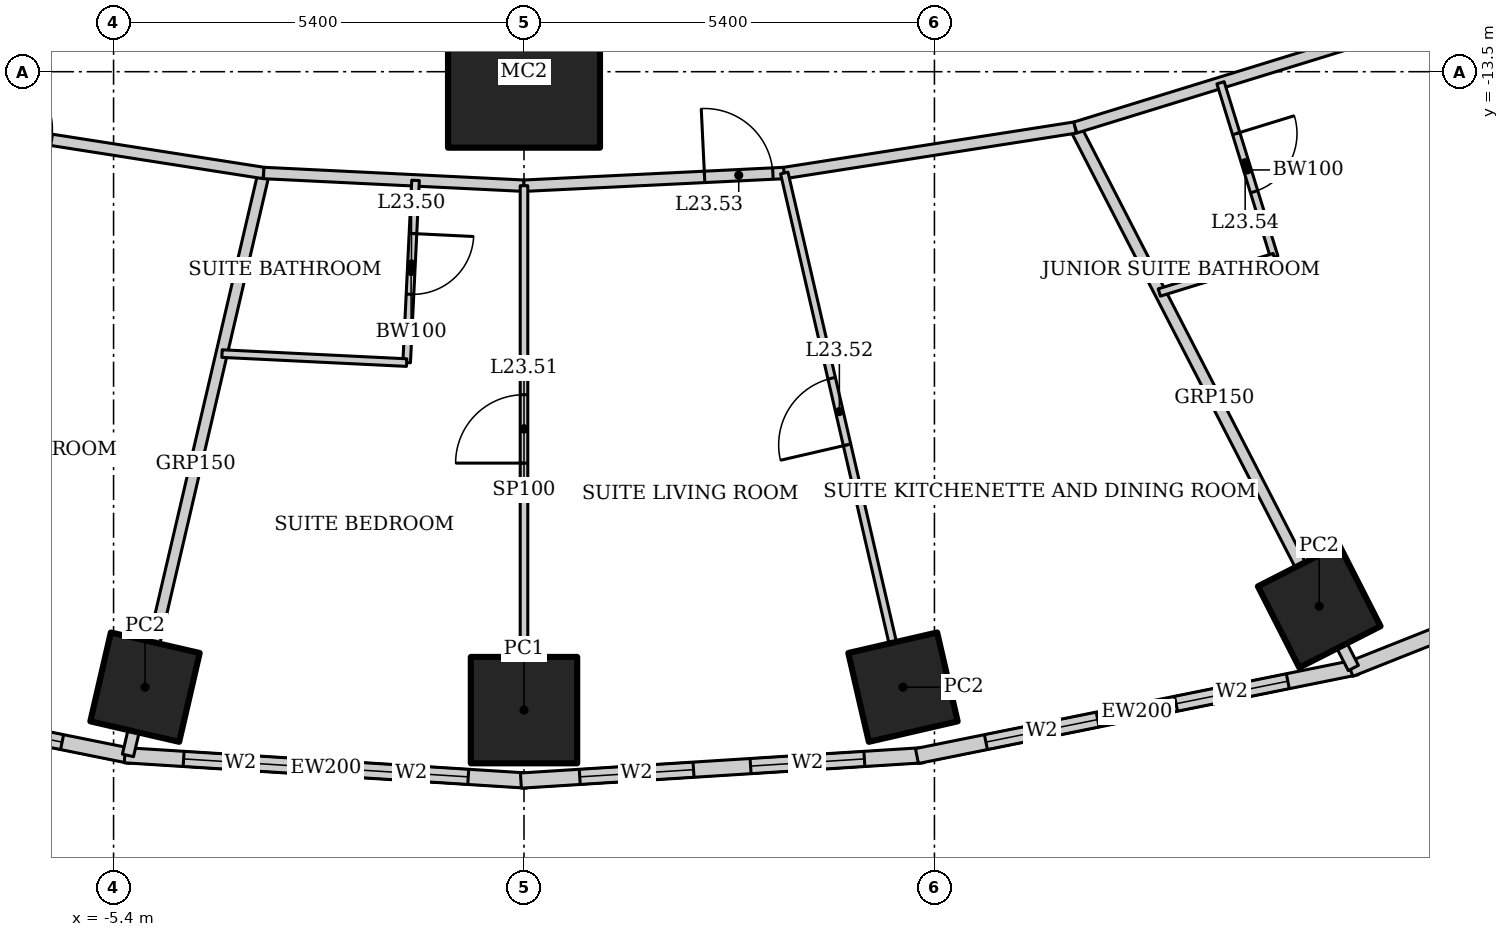
"""IFC4 building model, lengths in metres.
Left out: names, types, materials, properties, quantities, classifications, styles, units other than length and angle.
Written with IfcOpenShell. Run it as: python <this file> out.ifc"""

import sys

from ifc_helpers import new_model, si_unit, direction, frame, frame_2d, origin, origin_2d, place, context, subcontext, project, spatial, rectangle, hollow_rectangle, extrude, element, fill, save


model = new_model("IFC4")
c1 = context("Model", 3, precision=1e-05, world=origin(), true_north=direction((0.0, 1.0)))
c2 = subcontext(c1, "Body", "Model", "MODEL_VIEW")
j1 = project(units=[si_unit("LENGTHUNIT", "METRE"), si_unit("PLANEANGLEUNIT", "RADIAN")], contexts=[c1])
p1 = place(None, origin())
s1 = spatial("IfcSite", under=j1, at=p1, CompositionType="ELEMENT")
p2 = place(p1, origin())
s2 = spatial("IfcBuilding", under=s1, at=p2, CompositionType="ELEMENT")
p3 = place(p2, frame((0.0, 0.0, 98.2)))
s3 = spatial("IfcBuildingStorey", under=s2, at=p3, CompositionType="ELEMENT", Elevation=98.2)
p4 = place(p3, frame((0.0, -13.5, 0.0), z_axis=(0.0, 0.0, 1.0), x_axis=(1.0, 0.0, 0.0)))
e1 = element("IfcColumn", 1, at=p4, inside=s3, PredefinedType="COLUMN", context=c2, shape_type="SweptSolid", body=[
    extrude(hollow_rectangle(XDim=2.0, YDim=2.0, WallThickness=0.17, at=origin_2d()), origin(), (0.0, 0.0, 1.0), 3.6),
])
p5 = place(p3, frame((-4.986, -21.598, 0.0), z_axis=(0.0, 0.0, 1.0), x_axis=(0.224951054344, 0.974370064785, 0.0)))
e2 = element("IfcColumn", 2, at=p5, inside=s3, PredefinedType="COLUMN", context=c2, shape_type="SweptSolid", body=[
    extrude(hollow_rectangle(XDim=1.2, YDim=1.2, WallThickness=0.1, at=origin_2d()), origin(), (0.0, 0.0, 1.0), 3.6),
])
p6 = place(p3, frame((0.0, -21.9, 0.0), z_axis=(0.0, 0.0, 1.0), x_axis=(1.0, 0.0, 0.0)))
e3 = element("IfcColumn", 3, at=p6, inside=s3, PredefinedType="COLUMN", context=c2, shape_type="SweptSolid", body=[
    extrude(hollow_rectangle(XDim=1.4, YDim=1.4, WallThickness=0.1, at=origin_2d()), origin(), (0.0, 0.0, 1.0), 3.6),
])
for number, where, z_axis, x_axis in (
    (4, (4.986, -21.598, 0.0), (0.0, 0.0, 1.0), (0.974, 0.225, 0.0)),
    (5, (10.463, -20.534, 0.0), (0.0, 0.0, 1.0), (0.891, 0.454, 0.0)),
):
    element("IfcColumn", number, at=place(p3, frame(where, z_axis=z_axis, x_axis=x_axis)), inside=s3, PredefinedType="COLUMN", context=c2, shape_type="SweptSolid", body=[
        extrude(hollow_rectangle(XDim=1.2, YDim=1.2, WallThickness=0.1, at=origin_2d()), origin(), (0.0, 0.0, 1.0), 3.6),
    ])
p7 = place(p3, frame((-10.957, -21.337, 0.0), z_axis=(0.0, 0.0, 1.0), x_axis=(0.980251657452, -0.197754110105, 0.0)))
e6 = element("IfcWall", 6, at=p7, inside=s3, PredefinedType="SOLIDWALL", context=c2, shape_type="SweptSolid", body=[
    extrude(rectangle(XDim=5.904, YDim=0.2, at=frame_2d((2.952, 0.0))), origin(), (0.0, 0.0, 1.0), 3.45),
])
p8 = place(p7, frame((0.926, 0.0, 0.5)))
e7 = element("IfcOpeningElement", 7, at=p8, cuts=e6, PredefinedType="OPENING", context=c2, shape_type="SweptSolid", body=[
    extrude(rectangle(XDim=1.5, YDim=2.2, at=frame_2d((0.75, 1.1))), frame((0.0, 0.11, 0.0), z_axis=(0.0, -1.0, 0.0), x_axis=(1.0, 0.0, 0.0)), (0.0, 0.0, 1.0), 0.22),
])
p9 = place(p7, frame((3.478, 0.0, 0.5)))
e8 = element("IfcOpeningElement", 8, at=p9, cuts=e6, PredefinedType="OPENING", context=c2, shape_type="SweptSolid", body=[
    extrude(rectangle(XDim=1.5, YDim=2.2, at=frame_2d((0.75, 1.1))), frame((0.0, 0.11, 0.0), z_axis=(0.0, -1.0, 0.0), x_axis=(1.0, 0.0, 0.0)), (0.0, 0.0, 1.0), 0.22),
])
p10 = place(p3, frame((-5.253, -22.493, 0.0), z_axis=(0.0, 0.0, 1.0), x_axis=(0.998018582375, -0.062919863585, 0.0)))
e9 = element("IfcWall", 9, at=p10, inside=s3, PredefinedType="SOLIDWALL", context=c2, shape_type="SweptSolid", body=[
    extrude(rectangle(XDim=5.304, YDim=0.2, at=frame_2d((2.652, 0.0))), origin(), (0.0, 0.0, 1.0), 3.45),
])
p11 = place(p10, frame((0.776, 0.0, 0.5)))
e10 = element("IfcOpeningElement", 10, at=p11, cuts=e9, PredefinedType="OPENING", context=c2, shape_type="SweptSolid", body=[
    extrude(rectangle(XDim=1.5, YDim=2.2, at=frame_2d((0.75, 1.1))), frame((0.0, 0.11, 0.0), z_axis=(0.0, -1.0, 0.0), x_axis=(1.0, 0.0, 0.0)), (0.0, 0.0, 1.0), 0.22),
])
p12 = place(p10, frame((3.028, 0.0, 0.5)))
e11 = element("IfcOpeningElement", 11, at=p12, cuts=e9, PredefinedType="OPENING", context=c2, shape_type="SweptSolid", body=[
    extrude(rectangle(XDim=1.5, YDim=2.2, at=frame_2d((0.75, 1.1))), frame((0.0, 0.11, 0.0), z_axis=(0.0, -1.0, 0.0), x_axis=(1.0, 0.0, 0.0)), (0.0, 0.0, 1.0), 0.22),
])
p13 = place(p3, frame((-0.041, -22.827, 0.0), z_axis=(0.0, 0.0, 1.0), x_axis=(0.998018582375, 0.062919863585, 0.0)))
e12 = element("IfcWall", 12, at=p13, inside=s3, PredefinedType="SOLIDWALL", context=c2, shape_type="SweptSolid", body=[
    extrude(rectangle(XDim=5.304, YDim=0.2, at=frame_2d((2.652, 0.0))), origin(), (0.0, 0.0, 1.0), 3.45),
])
p14 = place(p13, frame((0.776, 0.0, 0.5)))
e13 = element("IfcOpeningElement", 13, at=p14, cuts=e12, PredefinedType="OPENING", context=c2, shape_type="SweptSolid", body=[
    extrude(rectangle(XDim=1.5, YDim=2.2, at=frame_2d((0.75, 1.1))), frame((0.0, 0.11, 0.0), z_axis=(0.0, -1.0, 0.0), x_axis=(1.0, 0.0, 0.0)), (0.0, 0.0, 1.0), 0.22),
])
p15 = place(p13, frame((3.028, 0.0, 0.5)))
e14 = element("IfcOpeningElement", 14, at=p15, cuts=e12, PredefinedType="OPENING", context=c2, shape_type="SweptSolid", body=[
    extrude(rectangle(XDim=1.5, YDim=2.2, at=frame_2d((0.75, 1.1))), frame((0.0, 0.11, 0.0), z_axis=(0.0, -1.0, 0.0), x_axis=(1.0, 0.0, 0.0)), (0.0, 0.0, 1.0), 0.22),
])
p16 = place(p3, frame((5.17, -22.504, 0.0), z_axis=(0.0, 0.0, 1.0), x_axis=(0.980251657452, 0.197754110105, 0.0)))
e15 = element("IfcWall", 15, at=p16, inside=s3, PredefinedType="SOLIDWALL", context=c2, shape_type="SweptSolid", body=[
    extrude(rectangle(XDim=5.904, YDim=0.2, at=frame_2d((2.952, 0.0))), origin(), (0.0, 0.0, 1.0), 3.45),
])
p17 = place(p16, frame((0.926, 0.0, 0.5)))
e16 = element("IfcOpeningElement", 16, at=p17, cuts=e15, PredefinedType="OPENING", context=c2, shape_type="SweptSolid", body=[
    extrude(rectangle(XDim=1.5, YDim=2.2, at=frame_2d((0.75, 1.1))), frame((0.0, 0.11, 0.0), z_axis=(0.0, -1.0, 0.0), x_axis=(1.0, 0.0, 0.0)), (0.0, 0.0, 1.0), 0.22),
])
p18 = place(p16, frame((3.478, 0.0, 0.5)))
e17 = element("IfcOpeningElement", 17, at=p18, cuts=e15, PredefinedType="OPENING", context=c2, shape_type="SweptSolid", body=[
    extrude(rectangle(XDim=1.5, YDim=2.2, at=frame_2d((0.75, 1.1))), frame((0.0, 0.11, 0.0), z_axis=(0.0, -1.0, 0.0), x_axis=(1.0, 0.0, 0.0)), (0.0, 0.0, 1.0), 0.22),
])
p19 = place(p3, frame((10.869, -21.363, 0.0), z_axis=(0.0, 0.0, 1.0), x_axis=(0.929358351251, 0.369178892895, 0.0)))
e18 = element("IfcWall", 18, at=p19, inside=s3, PredefinedType="SOLIDWALL", context=c2, shape_type="SweptSolid", body=[
    extrude(rectangle(XDim=7.692, YDim=0.2, at=frame_2d((3.846, 0.0))), origin(), (0.0, 0.0, 1.0), 3.45),
])
p20 = place(p19, frame((1.373, 0.0, 0.5)))
e19 = element("IfcOpeningElement", 19, at=p20, cuts=e18, PredefinedType="OPENING", context=c2, shape_type="SweptSolid", body=[
    extrude(rectangle(XDim=1.5, YDim=2.2, at=frame_2d((0.75, 1.1))), frame((0.0, 0.11, 0.0), z_axis=(0.0, -1.0, 0.0), x_axis=(1.0, 0.0, 0.0)), (0.0, 0.0, 1.0), 0.22),
])
p21 = place(p19, frame((4.819, 0.0, 0.5)))
e20 = element("IfcOpeningElement", 20, at=p21, cuts=e18, PredefinedType="OPENING", context=c2, shape_type="SweptSolid", body=[
    extrude(rectangle(XDim=1.5, YDim=2.2, at=frame_2d((0.75, 1.1))), frame((0.0, 0.11, 0.0), z_axis=(0.0, -1.0, 0.0), x_axis=(1.0, 0.0, 0.0)), (0.0, 0.0, 1.0), 0.22),
])
p22 = place(p3, frame((-5.211, -22.496, 0.0), z_axis=(0.0, 0.0, 1.0), x_axis=(0.227056984461, 0.973881474209, 0.0)))
e21 = element("IfcWall", 21, at=p22, inside=s3, PredefinedType="PARTITIONING", context=c2, shape_type="SweptSolid", body=[
    extrude(rectangle(XDim=7.869, YDim=0.15, at=frame_2d((3.934, 0.0))), origin(), (0.0, 0.0, 1.0), 2.767),
])
p23 = place(p3, frame((10.912, -21.346, 0.0), z_axis=(0.0, 0.0, 1.0), x_axis=(-0.45752665959, 0.889195904042, 0.0)))
e22 = element("IfcWall", 22, at=p23, inside=s3, PredefinedType="PARTITIONING", context=c2, shape_type="SweptSolid", body=[
    extrude(rectangle(XDim=7.997, YDim=0.15, at=frame_2d((3.999, 0.0))), origin(), (0.0, 0.0, 1.0), 2.528),
])
p24 = place(p3, frame((-7.253, -14.235, 0.0), z_axis=(0.0, 0.0, 1.0), x_axis=(0.988015036573, -0.154357660987, 0.0)))
e23 = element("IfcWall", 23, at=p24, inside=s3, PredefinedType="PARTITIONING", context=c2, shape_type="SweptSolid", body=[
    extrude(rectangle(XDim=3.875, YDim=0.15, at=frame_2d((1.938, 0.0))), origin(), (0.0, 0.0, 1.0), 3.45),
])
p25 = place(p24, frame((0.15, 0.0, 0.0)))
e24 = element("IfcOpeningElement", 24, at=p25, cuts=e23, PredefinedType="OPENING", context=c2, shape_type="SweptSolid", body=[
    extrude(rectangle(XDim=0.9, YDim=2.1, at=frame_2d((0.45, 1.05))), frame((0.0, 0.085, 0.0), z_axis=(0.0, -1.0, 0.0), x_axis=(1.0, 0.0, 0.0)), (0.0, 0.0, 1.0), 0.17),
])
p26 = place(p3, frame((-3.424, -14.833, 0.0), z_axis=(0.0, 0.0, 1.0), x_axis=(0.998809560203, -0.048779733975, 0.0)))
e25 = element("IfcWall", 25, at=p26, inside=s3, PredefinedType="PARTITIONING", context=c2, shape_type="SweptSolid", body=[
    extrude(rectangle(XDim=3.428, YDim=0.15, at=frame_2d((1.714, 0.0))), origin(), (0.0, 0.0, 1.0), 3.45),
])
p27 = place(p3, frame((0.0, -15.0, 0.0), z_axis=(0.0, 0.0, 1.0), x_axis=(0.998809560203, 0.048779733975, 0.0)))
e26 = element("IfcWall", 26, at=p27, inside=s3, PredefinedType="PARTITIONING", context=c2, shape_type="SweptSolid", body=[
    extrude(rectangle(XDim=3.428, YDim=0.15, at=frame_2d((1.714, 0.0))), origin(), (0.0, 0.0, 1.0), 3.45),
])
p28 = place(p27, frame((2.378, 0.0, 0.0)))
e27 = element("IfcOpeningElement", 27, at=p28, cuts=e26, PredefinedType="OPENING", context=c2, shape_type="SweptSolid", body=[
    extrude(rectangle(XDim=0.9, YDim=2.1, at=frame_2d((0.45, 1.05))), frame((0.0, 0.085, 0.0), z_axis=(0.0, -1.0, 0.0), x_axis=(1.0, 0.0, 0.0)), (0.0, 0.0, 1.0), 0.17),
])
p29 = place(p3, frame((3.424, -14.833, 0.0), z_axis=(0.0, 0.0, 1.0), x_axis=(0.988015036573, 0.154357660987, 0.0)))
e28 = element("IfcWall", 28, at=p29, inside=s3, PredefinedType="PARTITIONING", context=c2, shape_type="SweptSolid", body=[
    extrude(rectangle(XDim=3.875, YDim=0.15, at=frame_2d((1.938, 0.0))), origin(), (0.0, 0.0, 1.0), 3.45),
])
p30 = place(p3, frame((7.253, -14.235, 0.0), z_axis=(0.0, 0.0, 1.0), x_axis=(0.955657956744, 0.294478980085, 0.0)))
e29 = element("IfcWall", 29, at=p30, inside=s3, PredefinedType="PARTITIONING", context=c2, shape_type="SweptSolid", body=[
    extrude(rectangle(XDim=5.236, YDim=0.15, at=frame_2d((2.618, 0.0))), origin(), (0.0, 0.0, 1.0), 3.45),
])
p31 = place(p3, frame((-1.427, -14.93, 0.0), z_axis=(0.0, 0.0, 1.0), x_axis=(-0.048831470304, -0.998807032168, 0.0)))
e30 = element("IfcWall", 30, at=p31, inside=s3, PredefinedType="PARTITIONING", context=c2, shape_type="SweptSolid", body=[
    extrude(rectangle(XDim=2.4, YDim=0.1, at=frame_2d((1.2, 0.0))), origin(), (0.0, 0.0, 1.0), 3.45),
])
p32 = place(p31, frame((0.7, 0.0, 0.0)))
e31 = element("IfcOpeningElement", 31, at=p32, cuts=e30, PredefinedType="OPENING", context=c2, shape_type="SweptSolid", body=[
    extrude(rectangle(XDim=0.8, YDim=2.1, at=frame_2d((0.4, 1.05))), frame((0.0, 0.06, 0.0), z_axis=(0.0, -1.0, 0.0), x_axis=(1.0, 0.0, 0.0)), (0.0, 0.0, 1.0), 0.12),
])
p33 = place(p3, frame((-1.544, -17.327, 0.0), z_axis=(0.0, 0.0, 1.0), x_axis=(-0.998813899717, 0.048690797202, 0.0)))
e32 = element("IfcWall", 32, at=p33, inside=s3, PredefinedType="PARTITIONING", context=c2, shape_type="SweptSolid", body=[
    extrude(rectangle(XDim=2.432, YDim=0.1, at=frame_2d((1.216, 0.0))), origin(), (0.0, 0.0, 1.0), 3.45),
])
p34 = place(p3, frame((0.0, -21.4, 0.0), z_axis=(0.0, 0.0, 1.0), x_axis=(0.0, 1.0, 0.0)))
e33 = element("IfcWall", 33, at=p34, inside=s3, PredefinedType="PARTITIONING", context=c2, shape_type="SweptSolid", body=[
    extrude(rectangle(XDim=6.4, YDim=0.1, at=frame_2d((3.2, 0.0))), origin(), (0.0, 0.0, 1.0), 2.924),
])
p35 = place(p34, frame((2.75, 0.0, 0.0)))
e34 = element("IfcOpeningElement", 34, at=p35, cuts=e33, PredefinedType="OPENING", context=c2, shape_type="SweptSolid", body=[
    extrude(rectangle(XDim=0.9, YDim=2.1, at=frame_2d((0.45, 1.05))), frame((0.0, 0.06, 0.0), z_axis=(0.0, -1.0, 0.0), x_axis=(1.0, 0.0, 0.0)), (0.0, 0.0, 1.0), 0.12),
])
p36 = place(p3, frame((4.874, -21.111, 0.0), z_axis=(0.0, 0.0, 1.0), x_axis=(-0.224959129168, 0.97436820053, 0.0)))
e35 = element("IfcWall", 35, at=p36, inside=s3, PredefinedType="PARTITIONING", context=c2, shape_type="SweptSolid", body=[
    extrude(rectangle(XDim=6.443, YDim=0.1, at=frame_2d((3.222, 0.0))), origin(), (0.0, 0.0, 1.0), 2.767),
])
p37 = place(p36, frame((2.771, 0.0, 0.0)))
e36 = element("IfcOpeningElement", 36, at=p37, cuts=e35, PredefinedType="OPENING", context=c2, shape_type="SweptSolid", body=[
    extrude(rectangle(XDim=0.9, YDim=2.1, at=frame_2d((0.45, 1.05))), frame((0.0, 0.06, 0.0), z_axis=(0.0, -1.0, 0.0), x_axis=(1.0, 0.0, 0.0)), (0.0, 0.0, 1.0), 0.12),
])
p38 = place(p3, frame((9.164, -13.646, 0.0), z_axis=(0.0, 0.0, 1.0), x_axis=(0.294507586191, -0.955649141514, 0.0)))
e37 = element("IfcWall", 37, at=p38, inside=s3, PredefinedType="PARTITIONING", context=c2, shape_type="SweptSolid", body=[
    extrude(rectangle(XDim=2.4, YDim=0.1, at=frame_2d((1.2, 0.0))), origin(), (0.0, 0.0, 1.0), 3.45),
])
p39 = place(p38, frame((0.7, 0.0, 0.0)))
e38 = element("IfcOpeningElement", 38, at=p39, cuts=e37, PredefinedType="OPENING", context=c2, shape_type="SweptSolid", body=[
    extrude(rectangle(XDim=0.8, YDim=2.1, at=frame_2d((0.4, 1.05))), frame((0.0, 0.06, 0.0), z_axis=(0.0, -1.0, 0.0), x_axis=(1.0, 0.0, 0.0)), (0.0, 0.0, 1.0), 0.12),
])
p40 = place(p3, frame((9.871, -15.939, 0.0), z_axis=(0.0, 0.0, 1.0), x_axis=(-0.955642133669, -0.29453032502, 0.0)))
e39 = element("IfcWall", 39, at=p40, inside=s3, PredefinedType="PARTITIONING", context=c2, shape_type="SweptSolid", body=[
    extrude(rectangle(XDim=1.583, YDim=0.1, at=frame_2d((0.791, 0.0))), origin(), (0.0, 0.0, 1.0), 3.45),
])
p41 = place(p9, origin())
e40 = element("IfcWindow", 40, at=p41, inside=s3, PartitioningType="SINGLE_PANEL", PredefinedType="WINDOW", context=c2, shape_type="SweptSolid", body=[
    extrude(rectangle(XDim=1.5, YDim=2.2, at=frame_2d((0.75, 1.1))), frame((0.0, 0.03, 0.0), z_axis=(0.0, -1.0, 0.0), x_axis=(1.0, 0.0, 0.0)), (0.0, 0.0, 1.0), 0.06),
])
fill(e8, e40)
p42 = place(p11, origin())
e41 = element("IfcWindow", 41, at=p42, inside=s3, PartitioningType="SINGLE_PANEL", PredefinedType="WINDOW", context=c2, shape_type="SweptSolid", body=[
    extrude(rectangle(XDim=1.5, YDim=2.2, at=frame_2d((0.75, 1.1))), frame((0.0, 0.03, 0.0), z_axis=(0.0, -1.0, 0.0), x_axis=(1.0, 0.0, 0.0)), (0.0, 0.0, 1.0), 0.06),
])
fill(e10, e41)
p43 = place(p12, origin())
e42 = element("IfcWindow", 42, at=p43, inside=s3, PartitioningType="SINGLE_PANEL", PredefinedType="WINDOW", context=c2, shape_type="SweptSolid", body=[
    extrude(rectangle(XDim=1.5, YDim=2.2, at=frame_2d((0.75, 1.1))), frame((0.0, 0.03, 0.0), z_axis=(0.0, -1.0, 0.0), x_axis=(1.0, 0.0, 0.0)), (0.0, 0.0, 1.0), 0.06),
])
fill(e11, e42)
p44 = place(p14, origin())
e43 = element("IfcWindow", 43, at=p44, inside=s3, PartitioningType="SINGLE_PANEL", PredefinedType="WINDOW", context=c2, shape_type="SweptSolid", body=[
    extrude(rectangle(XDim=1.5, YDim=2.2, at=frame_2d((0.75, 1.1))), frame((0.0, 0.03, 0.0), z_axis=(0.0, -1.0, 0.0), x_axis=(1.0, 0.0, 0.0)), (0.0, 0.0, 1.0), 0.06),
])
fill(e13, e43)
p45 = place(p15, origin())
e44 = element("IfcWindow", 44, at=p45, inside=s3, PartitioningType="SINGLE_PANEL", PredefinedType="WINDOW", context=c2, shape_type="SweptSolid", body=[
    extrude(rectangle(XDim=1.5, YDim=2.2, at=frame_2d((0.75, 1.1))), frame((0.0, 0.03, 0.0), z_axis=(0.0, -1.0, 0.0), x_axis=(1.0, 0.0, 0.0)), (0.0, 0.0, 1.0), 0.06),
])
fill(e14, e44)
p46 = place(p17, origin())
e45 = element("IfcWindow", 45, at=p46, inside=s3, PartitioningType="SINGLE_PANEL", PredefinedType="WINDOW", context=c2, shape_type="SweptSolid", body=[
    extrude(rectangle(XDim=1.5, YDim=2.2, at=frame_2d((0.75, 1.1))), frame((0.0, 0.03, 0.0), z_axis=(0.0, -1.0, 0.0), x_axis=(1.0, 0.0, 0.0)), (0.0, 0.0, 1.0), 0.06),
])
fill(e16, e45)
p47 = place(p18, origin())
e46 = element("IfcWindow", 46, at=p47, inside=s3, PartitioningType="SINGLE_PANEL", PredefinedType="WINDOW", context=c2, shape_type="SweptSolid", body=[
    extrude(rectangle(XDim=1.5, YDim=2.2, at=frame_2d((0.75, 1.1))), frame((0.0, 0.03, 0.0), z_axis=(0.0, -1.0, 0.0), x_axis=(1.0, 0.0, 0.0)), (0.0, 0.0, 1.0), 0.06),
])
fill(e17, e46)
p48 = place(p32, origin())
e47 = element("IfcDoor", 47, at=p48, inside=s3, OperationType="SINGLE_SWING_LEFT", PredefinedType="DOOR", context=c2, shape_type="SweptSolid", body=[
    extrude(rectangle(XDim=0.8, YDim=2.1, at=frame_2d((0.4, 1.05))), frame((0.0, 0.025, 0.0), z_axis=(0.0, -1.0, 0.0), x_axis=(1.0, 0.0, 0.0)), (0.0, 0.0, 1.0), 0.05),
])
fill(e31, e47)
p49 = place(p35, origin())
e48 = element("IfcDoor", 48, at=p49, inside=s3, OperationType="SINGLE_SWING_LEFT", PredefinedType="DOOR", context=c2, shape_type="SweptSolid", body=[
    extrude(rectangle(XDim=0.9, YDim=2.1, at=frame_2d((0.45, 1.05))), frame((0.0, 0.025, 0.0), z_axis=(0.0, -1.0, 0.0), x_axis=(1.0, 0.0, 0.0)), (0.0, 0.0, 1.0), 0.05),
])
fill(e34, e48)
p50 = place(p37, origin())
e49 = element("IfcDoor", 49, at=p50, inside=s3, OperationType="SINGLE_SWING_LEFT", PredefinedType="DOOR", context=c2, shape_type="SweptSolid", body=[
    extrude(rectangle(XDim=0.9, YDim=2.1, at=frame_2d((0.45, 1.05))), frame((0.0, 0.025, 0.0), z_axis=(0.0, -1.0, 0.0), x_axis=(1.0, 0.0, 0.0)), (0.0, 0.0, 1.0), 0.05),
])
fill(e36, e49)
p51 = place(p28, origin())
e50 = element("IfcDoor", 50, at=p51, inside=s3, OperationType="SINGLE_SWING_LEFT", PredefinedType="DOOR", context=c2, shape_type="SweptSolid", body=[
    extrude(rectangle(XDim=0.9, YDim=2.1, at=frame_2d((0.45, 1.05))), frame((0.0, 0.025, 0.0), z_axis=(0.0, -1.0, 0.0), x_axis=(1.0, 0.0, 0.0)), (0.0, 0.0, 1.0), 0.05),
])
fill(e27, e50)
p52 = place(p39, origin())
e51 = element("IfcDoor", 51, at=p52, inside=s3, OperationType="SINGLE_SWING_LEFT", PredefinedType="DOOR", context=c2, shape_type="SweptSolid", body=[
    extrude(rectangle(XDim=0.8, YDim=2.1, at=frame_2d((0.4, 1.05))), frame((0.0, 0.025, 0.0), z_axis=(0.0, -1.0, 0.0), x_axis=(1.0, 0.0, 0.0)), (0.0, 0.0, 1.0), 0.05),
])
fill(e38, e51)
save(model, sys.argv[1])
